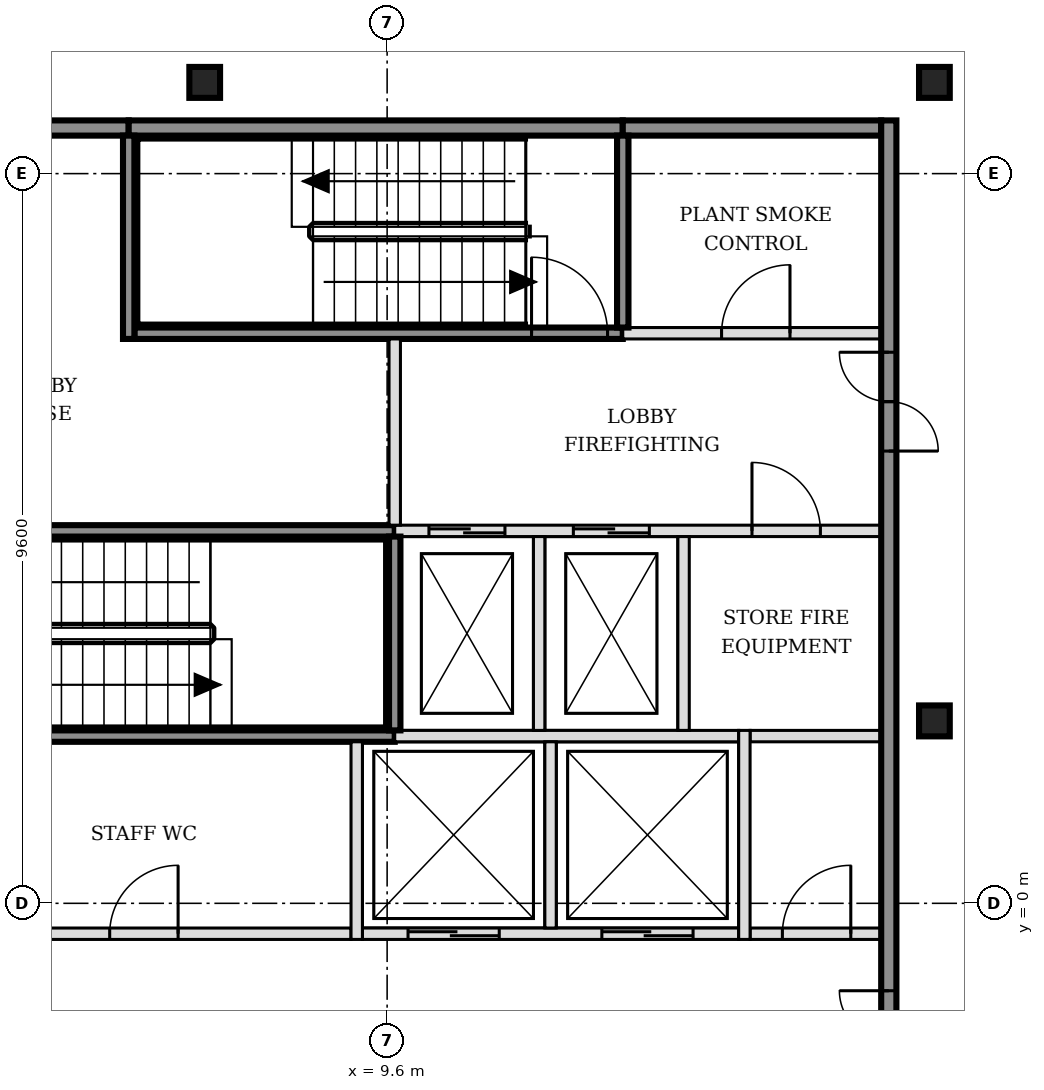
"""IFC4 building model, lengths in metres.
Left out: names, types, materials, properties, quantities, classifications, styles, units other than length and angle.
Written with IfcOpenShell. Run it as: python <this file> out.ifc"""

import sys

from ifc_helpers import new_model, si_unit, direction, frame, frame_2d, origin, origin_2d, place, context, subcontext, project, spatial, rectangle, i_section, extrude, element, fill, save


model = new_model("IFC4")
c1 = context("Model", 3, precision=1e-05, world=origin(), true_north=direction((0.0, 1.0)))
c2 = subcontext(c1, "Body", "Model", "MODEL_VIEW")
j1 = project(units=[si_unit("LENGTHUNIT", "METRE"), si_unit("PLANEANGLEUNIT", "RADIAN")], contexts=[c1])
p1 = place(None, origin())
s1 = spatial("IfcSite", under=j1, at=p1, CompositionType="ELEMENT")
p2 = place(p1, origin())
s2 = spatial("IfcBuilding", under=s1, at=p2, CompositionType="ELEMENT")
p3 = place(p2, frame((0.0, 0.0, 193.8)))
s3 = spatial("IfcBuildingStorey", under=s2, at=p3, CompositionType="ELEMENT", Elevation=193.8)
for number, where, z_axis, x_axis in (
    (1, (16.8, 2.4, -0.15), (0.0, 0.0, 1.0), (1.0, 0.0, 0.0)),
    (2, (7.2, 10.8, -0.15), (0.0, 0.0, 1.0), (1.0, 0.0, 0.0)),
    (3, (16.8, 10.8, -0.15), (0.0, 0.0, 1.0), (1.0, 0.0, 0.0)),
):
    element("IfcColumn", number, at=place(p3, frame(where, z_axis=z_axis, x_axis=x_axis)), inside=s3, PredefinedType="COLUMN", context=c2, shape_type="SweptSolid", body=[
        extrude(i_section(OverallWidth=0.404, OverallDepth=0.407, WebThickness=0.027, FlangeThickness=0.044, FilletRadius=0.015, at=origin_2d()), origin(), (0.0, 0.0, 1.0), 3.6),
    ])
p4 = place(p3, frame((-1.7, -0.4, 0.0), z_axis=(0.0, 0.0, 1.0), x_axis=(1.0, 0.0, 0.0)))
e4 = element("IfcWall", 4, at=p4, inside=s3, PredefinedType="PARTITIONING", context=c2, shape_type="SweptSolid", body=[
    extrude(rectangle(XDim=10.825, YDim=0.15, at=frame_2d((5.413, 0.0))), origin(), (0.0, 0.0, 1.0), 3.45),
])
p5 = place(p4, frame((2.15, 0.0, 0.0)))
e5 = element("IfcOpeningElement", 5, at=p5, cuts=e4, PredefinedType="OPENING", context=c2, shape_type="SweptSolid", body=[
    extrude(rectangle(XDim=0.9, YDim=2.1, at=frame_2d((0.45, 1.05))), frame((0.0, 0.085, 0.0), z_axis=(0.0, -1.0, 0.0), x_axis=(1.0, 0.0, 0.0)), (0.0, 0.0, 1.0), 0.17),
])
p6 = place(p4, frame((7.65, 0.0, 0.0)))
e6 = element("IfcOpeningElement", 6, at=p6, cuts=e4, PredefinedType="OPENING", context=c2, shape_type="SweptSolid", body=[
    extrude(rectangle(XDim=0.9, YDim=2.1, at=frame_2d((0.45, 1.05))), frame((0.0, 0.085, 0.0), z_axis=(0.0, -1.0, 0.0), x_axis=(1.0, 0.0, 0.0)), (0.0, 0.0, 1.0), 0.17),
])
p7 = place(p3, frame((9.275, -0.4, 0.0), z_axis=(0.0, 0.0, 1.0), x_axis=(1.0, 0.0, 0.0)))
e7 = element("IfcWall", 7, at=p7, inside=s3, PredefinedType="SOLIDWALL", context=c2, shape_type="SweptSolid", body=[
    extrude(rectangle(XDim=4.95, YDim=0.15, at=frame_2d((2.475, 0.0))), origin(), (0.0, 0.0, 1.0), 3.45),
])
p8 = place(p7, frame((0.6, 0.0, 0.0)))
e8 = element("IfcOpeningElement", 8, at=p8, cuts=e7, PredefinedType="OPENING", context=c2, shape_type="SweptSolid", body=[
    extrude(rectangle(XDim=1.2, YDim=2.1, at=frame_2d((0.6, 1.05))), frame((0.0, 0.085, 0.0), z_axis=(0.0, -1.0, 0.0), x_axis=(1.0, 0.0, 0.0)), (0.0, 0.0, 1.0), 0.17),
])
p9 = place(p7, frame((3.15, 0.0, 0.0)))
e9 = element("IfcOpeningElement", 9, at=p9, cuts=e7, PredefinedType="OPENING", context=c2, shape_type="SweptSolid", body=[
    extrude(rectangle(XDim=1.2, YDim=2.1, at=frame_2d((0.6, 1.05))), frame((0.0, 0.085, 0.0), z_axis=(0.0, -1.0, 0.0), x_axis=(1.0, 0.0, 0.0)), (0.0, 0.0, 1.0), 0.17),
])
p10 = place(p3, frame((14.375, -0.4, 0.0), z_axis=(0.0, 0.0, 1.0), x_axis=(1.0, 0.0, 0.0)))
e10 = element("IfcWall", 10, at=p10, inside=s3, PredefinedType="PARTITIONING", context=c2, shape_type="SweptSolid", body=[
    extrude(rectangle(XDim=1.725, YDim=0.15, at=frame_2d((0.863, 0.0))), origin(), (0.0, 0.0, 1.0), 3.45),
])
p11 = place(p10, frame((0.425, 0.0, 0.0)))
e11 = element("IfcOpeningElement", 11, at=p11, cuts=e10, PredefinedType="OPENING", context=c2, shape_type="SweptSolid", body=[
    extrude(rectangle(XDim=0.9, YDim=2.1, at=frame_2d((0.45, 1.05))), frame((0.0, 0.085, 0.0), z_axis=(0.0, -1.0, 0.0), x_axis=(1.0, 0.0, 0.0)), (0.0, 0.0, 1.0), 0.17),
])
p12 = place(p3, frame((3.2, 2.2, 0.0), z_axis=(0.0, 0.0, 1.0), x_axis=(1.0, 0.0, 0.0)))
e12 = element("IfcWall", 12, at=p12, inside=s3, PredefinedType="SOLIDWALL", context=c2, shape_type="SweptSolid", body=[
    extrude(rectangle(XDim=6.5, YDim=0.15, at=frame_2d((3.25, 0.0))), origin(), (0.0, 0.0, 1.0), 3.45),
])
p13 = place(p3, frame((9.7, 2.2, 0.0), z_axis=(0.0, 0.0, 1.0), x_axis=(1.0, 0.0, 0.0)))
e13 = element("IfcWall", 13, at=p13, inside=s3, PredefinedType="SOLIDWALL", context=c2, shape_type="SweptSolid", body=[
    extrude(rectangle(XDim=4.525, YDim=0.15, at=frame_2d((2.263, 0.0))), origin(), (0.0, 0.0, 1.0), 3.45),
])
p14 = place(p3, frame((14.375, 2.2, 0.0), z_axis=(0.0, 0.0, 1.0), x_axis=(1.0, 0.0, 0.0)))
e14 = element("IfcWall", 14, at=p14, inside=s3, PredefinedType="PARTITIONING", context=c2, shape_type="SweptSolid", body=[
    extrude(rectangle(XDim=1.725, YDim=0.15, at=frame_2d((0.863, 0.0))), origin(), (0.0, 0.0, 1.0), 3.45),
])
p15 = place(p3, frame((3.2, 4.9, 0.0), z_axis=(0.0, 0.0, 1.0), x_axis=(1.0, 0.0, 0.0)))
e15 = element("IfcWall", 15, at=p15, inside=s3, PredefinedType="SOLIDWALL", context=c2, shape_type="SweptSolid", body=[
    extrude(rectangle(XDim=6.5, YDim=0.15, at=frame_2d((3.25, 0.0))), origin(), (0.0, 0.0, 1.0), 3.45),
])
p16 = place(p15, frame((0.175, 0.0, 0.0)))
e16 = element("IfcOpeningElement", 16, at=p16, cuts=e15, PredefinedType="OPENING", context=c2, shape_type="SweptSolid", body=[
    extrude(rectangle(XDim=1.0, YDim=2.1, at=frame_2d((0.5, 1.05))), frame((0.0, 0.085, 0.0), z_axis=(0.0, -1.0, 0.0), x_axis=(1.0, 0.0, 0.0)), (0.0, 0.0, 1.0), 0.17),
])
p17 = place(p3, frame((9.7, 4.9, 0.0), z_axis=(0.0, 0.0, 1.0), x_axis=(1.0, 0.0, 0.0)))
e17 = element("IfcWall", 17, at=p17, inside=s3, PredefinedType="SOLIDWALL", context=c2, shape_type="SweptSolid", body=[
    extrude(rectangle(XDim=6.4, YDim=0.15, at=frame_2d((3.2, 0.0))), origin(), (0.0, 0.0, 1.0), 3.45),
])
p18 = place(p17, frame((0.45, 0.0, 0.0)))
e18 = element("IfcOpeningElement", 18, at=p18, cuts=e17, PredefinedType="OPENING", context=c2, shape_type="SweptSolid", body=[
    extrude(rectangle(XDim=1.0, YDim=2.1, at=frame_2d((0.5, 1.05))), frame((0.0, 0.085, 0.0), z_axis=(0.0, -1.0, 0.0), x_axis=(1.0, 0.0, 0.0)), (0.0, 0.0, 1.0), 0.17),
])
p19 = place(p17, frame((2.35, 0.0, 0.0)))
e19 = element("IfcOpeningElement", 19, at=p19, cuts=e17, PredefinedType="OPENING", context=c2, shape_type="SweptSolid", body=[
    extrude(rectangle(XDim=1.0, YDim=2.1, at=frame_2d((0.5, 1.05))), frame((0.0, 0.085, 0.0), z_axis=(0.0, -1.0, 0.0), x_axis=(1.0, 0.0, 0.0)), (0.0, 0.0, 1.0), 0.17),
])
p20 = place(p17, frame((4.7, 0.0, 0.0)))
e20 = element("IfcOpeningElement", 20, at=p20, cuts=e17, PredefinedType="OPENING", context=c2, shape_type="SweptSolid", body=[
    extrude(rectangle(XDim=0.9, YDim=2.1, at=frame_2d((0.45, 1.05))), frame((0.0, 0.085, 0.0), z_axis=(0.0, -1.0, 0.0), x_axis=(1.0, 0.0, 0.0)), (0.0, 0.0, 1.0), 0.17),
])
p21 = place(p3, frame((6.275, 7.5, 0.0), z_axis=(0.0, 0.0, 1.0), x_axis=(1.0, 0.0, 0.0)))
e21 = element("IfcWall", 21, at=p21, inside=s3, PredefinedType="SOLIDWALL", context=c2, shape_type="SweptSolid", body=[
    extrude(rectangle(XDim=6.425, YDim=0.15, at=frame_2d((3.212, 0.0))), origin(), (0.0, 0.0, 1.0), 3.45),
])
p22 = place(p21, frame((5.225, 0.0, 0.0)))
e22 = element("IfcOpeningElement", 22, at=p22, cuts=e21, PredefinedType="OPENING", context=c2, shape_type="SweptSolid", body=[
    extrude(rectangle(XDim=1.0, YDim=2.1, at=frame_2d((0.5, 1.05))), frame((0.0, 0.085, 0.0), z_axis=(0.0, -1.0, 0.0), x_axis=(1.0, 0.0, 0.0)), (0.0, 0.0, 1.0), 0.17),
])
p23 = place(p3, frame((12.7, 7.5, 0.0), z_axis=(0.0, 0.0, 1.0), x_axis=(1.0, 0.0, 0.0)))
e23 = element("IfcWall", 23, at=p23, inside=s3, PredefinedType="SOLIDWALL", context=c2, shape_type="SweptSolid", body=[
    extrude(rectangle(XDim=3.4, YDim=0.15, at=frame_2d((1.7, 0.0))), origin(), (0.0, 0.0, 1.0), 3.45),
])
p24 = place(p23, frame((1.3, 0.0, 0.0)))
e24 = element("IfcOpeningElement", 24, at=p24, cuts=e23, PredefinedType="OPENING", context=c2, shape_type="SweptSolid", body=[
    extrude(rectangle(XDim=0.9, YDim=2.1, at=frame_2d((0.45, 1.05))), frame((0.0, 0.085, 0.0), z_axis=(0.0, -1.0, 0.0), x_axis=(1.0, 0.0, 0.0)), (0.0, 0.0, 1.0), 0.17),
])
p25 = place(p3, frame((-1.7, 10.2, 0.0), z_axis=(0.0, 0.0, 1.0), x_axis=(1.0, 0.0, 0.0)))
e25 = element("IfcWall", 25, at=p25, inside=s3, PredefinedType="SOLIDWALL", context=c2, shape_type="SweptSolid", body=[
    extrude(rectangle(XDim=7.9, YDim=0.2, at=frame_2d((3.95, 0.0))), origin(), (0.0, 0.0, 1.0), 3.45),
])
p26 = place(p3, frame((6.2, 10.2, 0.0), z_axis=(0.0, 0.0, 1.0), x_axis=(1.0, 0.0, 0.0)))
e26 = element("IfcWall", 26, at=p26, inside=s3, PredefinedType="SOLIDWALL", context=c2, shape_type="SweptSolid", body=[
    extrude(rectangle(XDim=6.5, YDim=0.2, at=frame_2d((3.25, 0.0))), origin(), (0.0, 0.0, 1.0), 3.45),
])
p27 = place(p3, frame((12.7, 10.2, 0.0), z_axis=(0.0, 0.0, 1.0), x_axis=(1.0, 0.0, 0.0)))
e27 = element("IfcWall", 27, at=p27, inside=s3, PredefinedType="SOLIDWALL", context=c2, shape_type="SweptSolid", body=[
    extrude(rectangle(XDim=3.4, YDim=0.2, at=frame_2d((1.7, 0.0))), origin(), (0.0, 0.0, 1.0), 3.45),
])
p28 = place(p3, frame((6.2, 7.425, 0.0), z_axis=(0.0, 0.0, 1.0), x_axis=(0.0, 1.0, 0.0)))
e28 = element("IfcWall", 28, at=p28, inside=s3, PredefinedType="SOLIDWALL", context=c2, shape_type="SweptSolid", body=[
    extrude(rectangle(XDim=2.675, YDim=0.15, at=frame_2d((1.337, 0.0))), origin(), (0.0, 0.0, 1.0), 3.45),
])
p29 = place(p3, frame((9.2, -0.475, 0.0), z_axis=(0.0, 0.0, 1.0), x_axis=(0.0, 1.0, 0.0)))
e29 = element("IfcWall", 29, at=p29, inside=s3, PredefinedType="SOLIDWALL", context=c2, shape_type="SweptSolid", body=[
    extrude(rectangle(XDim=2.6, YDim=0.15, at=frame_2d((1.3, 0.0))), origin(), (0.0, 0.0, 1.0), 3.45),
])
p30 = place(p3, frame((9.7, 2.275, 0.0), z_axis=(0.0, 0.0, 1.0), x_axis=(0.0, 1.0, 0.0)))
e30 = element("IfcWall", 30, at=p30, inside=s3, PredefinedType="SOLIDWALL", context=c2, shape_type="SweptSolid", body=[
    extrude(rectangle(XDim=2.55, YDim=0.15, at=frame_2d((1.275, 0.0))), origin(), (0.0, 0.0, 1.0), 3.45),
])
p31 = place(p3, frame((9.7, 4.975, 0.0), z_axis=(0.0, 0.0, 1.0), x_axis=(0.0, 1.0, 0.0)))
e31 = element("IfcWall", 31, at=p31, inside=s3, PredefinedType="SOLIDWALL", context=c2, shape_type="SweptSolid", body=[
    extrude(rectangle(XDim=2.45, YDim=0.15, at=frame_2d((1.225, 0.0))), origin(), (0.0, 0.0, 1.0), 3.45),
])
p32 = place(p3, frame((11.6, 2.275, 0.0), z_axis=(0.0, 0.0, 1.0), x_axis=(0.0, 1.0, 0.0)))
e32 = element("IfcWall", 32, at=p32, inside=s3, PredefinedType="SOLIDWALL", context=c2, shape_type="SweptSolid", body=[
    extrude(rectangle(XDim=2.55, YDim=0.15, at=frame_2d((1.275, 0.0))), origin(), (0.0, 0.0, 1.0), 3.45),
])
p33 = place(p3, frame((11.75, -0.325, 0.0), z_axis=(0.0, 0.0, 1.0), x_axis=(0.0, 1.0, 0.0)))
e33 = element("IfcWall", 33, at=p33, inside=s3, PredefinedType="SOLIDWALL", context=c2, shape_type="SweptSolid", body=[
    extrude(rectangle(XDim=2.45, YDim=0.15, at=frame_2d((1.225, 0.0))), origin(), (0.0, 0.0, 1.0), 3.45),
])
p34 = place(p3, frame((12.7, 7.575, 0.0), z_axis=(0.0, 0.0, 1.0), x_axis=(0.0, 1.0, 0.0)))
e34 = element("IfcWall", 34, at=p34, inside=s3, PredefinedType="SOLIDWALL", context=c2, shape_type="SweptSolid", body=[
    extrude(rectangle(XDim=2.525, YDim=0.15, at=frame_2d((1.263, 0.0))), origin(), (0.0, 0.0, 1.0), 3.45),
])
p35 = place(p3, frame((13.5, 2.275, 0.0), z_axis=(0.0, 0.0, 1.0), x_axis=(0.0, 1.0, 0.0)))
e35 = element("IfcWall", 35, at=p35, inside=s3, PredefinedType="SOLIDWALL", context=c2, shape_type="SweptSolid", body=[
    extrude(rectangle(XDim=2.55, YDim=0.15, at=frame_2d((1.275, 0.0))), origin(), (0.0, 0.0, 1.0), 3.45),
])
p36 = place(p3, frame((14.3, -0.475, 0.0), z_axis=(0.0, 0.0, 1.0), x_axis=(0.0, 1.0, 0.0)))
e36 = element("IfcWall", 36, at=p36, inside=s3, PredefinedType="SOLIDWALL", context=c2, shape_type="SweptSolid", body=[
    extrude(rectangle(XDim=2.75, YDim=0.15, at=frame_2d((1.375, 0.0))), origin(), (0.0, 0.0, 1.0), 3.45),
])
p37 = place(p3, frame((16.2, -5.5, 0.0), z_axis=(0.0, 0.0, 1.0), x_axis=(0.0, 1.0, 0.0)))
e37 = element("IfcWall", 37, at=p37, inside=s3, PredefinedType="SOLIDWALL", context=c2, shape_type="SweptSolid", body=[
    extrude(rectangle(XDim=15.8, YDim=0.2, at=frame_2d((7.9, 0.0))), origin(), (0.0, 0.0, 1.0), 3.45),
])
p38 = place(p37, frame((3.05, 0.0, 0.0)))
e38 = element("IfcOpeningElement", 38, at=p38, cuts=e37, PredefinedType="OPENING", context=c2, shape_type="SweptSolid", body=[
    extrude(rectangle(XDim=1.3, YDim=2.1, at=frame_2d((0.65, 1.05))), frame((0.0, 0.11, 0.0), z_axis=(0.0, -1.0, 0.0), x_axis=(1.0, 0.0, 0.0)), (0.0, 0.0, 1.0), 0.22),
])
p39 = place(p37, frame((11.45, 0.0, 0.0)))
e39 = element("IfcOpeningElement", 39, at=p39, cuts=e37, PredefinedType="OPENING", context=c2, shape_type="SweptSolid", body=[
    extrude(rectangle(XDim=1.3, YDim=2.1, at=frame_2d((0.65, 1.05))), frame((0.0, 0.11, 0.0), z_axis=(0.0, -1.0, 0.0), x_axis=(1.0, 0.0, 0.0)), (0.0, 0.0, 1.0), 0.22),
])
p40 = place(p8, origin())
e40 = element("IfcDoor", 40, at=p40, inside=s3, OperationType="DOUBLE_DOOR_SLIDING", PredefinedType="DOOR", context=c2, shape_type="SweptSolid", body=[
    extrude(rectangle(XDim=1.2, YDim=2.1, at=frame_2d((0.6, 1.05))), frame((0.0, 0.025, 0.0), z_axis=(0.0, -1.0, 0.0), x_axis=(1.0, 0.0, 0.0)), (0.0, 0.0, 1.0), 0.05),
])
fill(e8, e40)
p41 = place(p9, origin())
e41 = element("IfcDoor", 41, at=p41, inside=s3, OperationType="DOUBLE_DOOR_SLIDING", PredefinedType="DOOR", context=c2, shape_type="SweptSolid", body=[
    extrude(rectangle(XDim=1.2, YDim=2.1, at=frame_2d((0.6, 1.05))), frame((0.0, 0.025, 0.0), z_axis=(0.0, -1.0, 0.0), x_axis=(1.0, 0.0, 0.0)), (0.0, 0.0, 1.0), 0.05),
])
fill(e9, e41)
p42 = place(p18, origin())
e42 = element("IfcDoor", 42, at=p42, inside=s3, OperationType="DOUBLE_DOOR_SLIDING", PredefinedType="DOOR", context=c2, shape_type="SweptSolid", body=[
    extrude(rectangle(XDim=1.0, YDim=2.1, at=frame_2d((0.5, 1.05))), frame((0.0, 0.025, 0.0), z_axis=(0.0, -1.0, 0.0), x_axis=(1.0, 0.0, 0.0)), (0.0, 0.0, 1.0), 0.05),
])
fill(e18, e42)
p43 = place(p19, origin())
e43 = element("IfcDoor", 43, at=p43, inside=s3, OperationType="DOUBLE_DOOR_SLIDING", PredefinedType="DOOR", context=c2, shape_type="SweptSolid", body=[
    extrude(rectangle(XDim=1.0, YDim=2.1, at=frame_2d((0.5, 1.05))), frame((0.0, 0.025, 0.0), z_axis=(0.0, -1.0, 0.0), x_axis=(1.0, 0.0, 0.0)), (0.0, 0.0, 1.0), 0.05),
])
fill(e19, e43)
p44 = place(p22, origin())
e44 = element("IfcDoor", 44, at=p44, inside=s3, OperationType="SINGLE_SWING_LEFT", PredefinedType="DOOR", context=c2, shape_type="SweptSolid", body=[
    extrude(rectangle(XDim=1.0, YDim=2.1, at=frame_2d((0.5, 1.05))), frame((0.0, 0.025, 0.0), z_axis=(0.0, -1.0, 0.0), x_axis=(1.0, 0.0, 0.0)), (0.0, 0.0, 1.0), 0.05),
])
fill(e22, e44)
p45 = place(p38, origin())
e45 = element("IfcDoor", 45, at=p45, inside=s3, OperationType="DOUBLE_DOOR_SINGLE_SWING", PredefinedType="DOOR", context=c2, shape_type="SweptSolid", body=[
    extrude(rectangle(XDim=1.3, YDim=2.1, at=frame_2d((0.65, 1.05))), frame((0.0, 0.025, 0.0), z_axis=(0.0, -1.0, 0.0), x_axis=(1.0, 0.0, 0.0)), (0.0, 0.0, 1.0), 0.05),
])
fill(e38, e45)
p46 = place(p39, origin())
e46 = element("IfcDoor", 46, at=p46, inside=s3, OperationType="DOUBLE_DOOR_SINGLE_SWING", PredefinedType="DOOR", context=c2, shape_type="SweptSolid", body=[
    extrude(rectangle(XDim=1.3, YDim=2.1, at=frame_2d((0.65, 1.05))), frame((0.0, 0.025, 0.0), z_axis=(0.0, -1.0, 0.0), x_axis=(1.0, 0.0, 0.0)), (0.0, 0.0, 1.0), 0.05),
])
fill(e39, e46)
p47 = place(p11, origin())
e47 = element("IfcDoor", 47, at=p47, inside=s3, OperationType="SINGLE_SWING_RIGHT", PredefinedType="DOOR", context=c2, shape_type="SweptSolid", body=[
    extrude(rectangle(XDim=0.9, YDim=2.1, at=frame_2d((0.45, 1.05))), frame((0.0, 0.025, 0.0), z_axis=(0.0, -1.0, 0.0), x_axis=(1.0, 0.0, 0.0)), (0.0, 0.0, 1.0), 0.05),
])
fill(e11, e47)
p48 = place(p20, origin())
e48 = element("IfcDoor", 48, at=p48, inside=s3, OperationType="SINGLE_SWING_LEFT", PredefinedType="DOOR", context=c2, shape_type="SweptSolid", body=[
    extrude(rectangle(XDim=0.9, YDim=2.1, at=frame_2d((0.45, 1.05))), frame((0.0, 0.025, 0.0), z_axis=(0.0, -1.0, 0.0), x_axis=(1.0, 0.0, 0.0)), (0.0, 0.0, 1.0), 0.05),
])
fill(e20, e48)
p49 = place(p24, origin())
e49 = element("IfcDoor", 49, at=p49, inside=s3, OperationType="SINGLE_SWING_RIGHT", PredefinedType="DOOR", context=c2, shape_type="SweptSolid", body=[
    extrude(rectangle(XDim=0.9, YDim=2.1, at=frame_2d((0.45, 1.05))), frame((0.0, 0.025, 0.0), z_axis=(0.0, -1.0, 0.0), x_axis=(1.0, 0.0, 0.0)), (0.0, 0.0, 1.0), 0.05),
])
fill(e24, e49)
p50 = place(p6, origin())
e50 = element("IfcDoor", 50, at=p50, inside=s3, OperationType="SINGLE_SWING_RIGHT", PredefinedType="DOOR", context=c2, shape_type="SweptSolid", body=[
    extrude(rectangle(XDim=0.9, YDim=2.1, at=frame_2d((0.45, 1.05))), frame((0.0, 0.025, 0.0), z_axis=(0.0, -1.0, 0.0), x_axis=(1.0, 0.0, 0.0)), (0.0, 0.0, 1.0), 0.05),
])
fill(e6, e50)
save(model, sys.argv[1])
